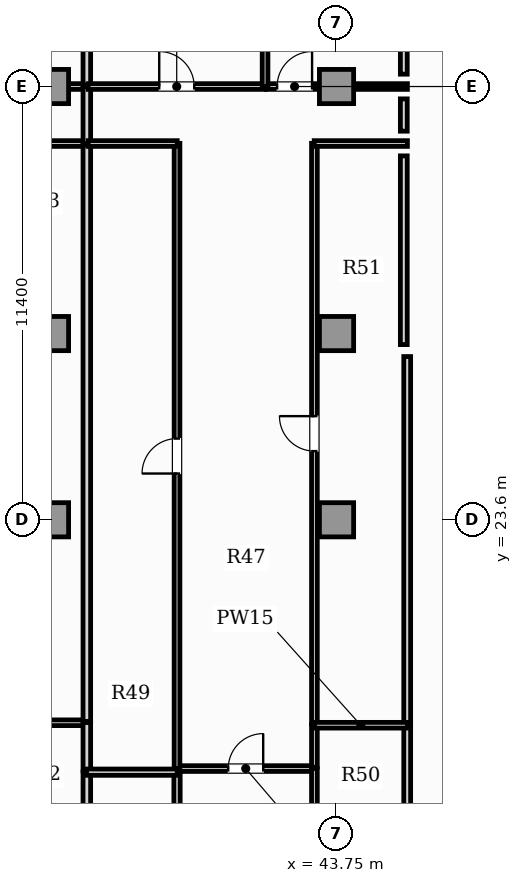
"""IFC4 building model, lengths in metres.
Left out: names, types, materials, properties, quantities, classifications, styles, units other than length and angle.
Written with IfcOpenShell. Run it as: python <this file> out.ifc"""

import sys

from ifc_helpers import new_model, si_unit, direction, frame, frame_2d, origin, origin_2d, place, context, subcontext, project, spatial, rectangle, extrude, element, fill, save


model = new_model("IFC4")
c1 = context("Model", 3, precision=1e-05, world=origin(), true_north=direction((0.0, 1.0)))
c2 = subcontext(c1, "Body", "Model", "MODEL_VIEW")
j1 = project(units=[si_unit("LENGTHUNIT", "METRE"), si_unit("PLANEANGLEUNIT", "RADIAN")], contexts=[c1])
p1 = place(None, origin())
s1 = spatial("IfcSite", under=j1, at=p1, CompositionType="ELEMENT")
p2 = place(p1, origin())
s2 = spatial("IfcBuilding", under=s1, at=p2, CompositionType="ELEMENT")
p3 = place(p2, frame((0.0, 0.0, 92.6)))
s3 = spatial("IfcBuildingStorey", under=s2, at=p3, CompositionType="ELEMENT", Elevation=92.6)
for number, where, z_axis, x_axis in (
    (1, (36.25, 23.6, 0.0), (0.0, 0.0, 1.0), (1.0, 0.0, 0.0)),
    (2, (43.75, 23.6, 0.0), (0.0, 0.0, 1.0), (1.0, 0.0, 0.0)),
    (3, (36.25, 28.5, 0.0), (0.0, 0.0, 1.0), (1.0, 0.0, 0.0)),
    (4, (43.75, 28.5, 0.0), (0.0, 0.0, 1.0), (1.0, 0.0, 0.0)),
    (5, (36.25, 35.0, 0.0), (0.0, 0.0, 1.0), (1.0, 0.0, 0.0)),
    (6, (43.75, 35.0, 0.0), (0.0, 0.0, 1.0), (1.0, 0.0, 0.0)),
):
    element("IfcColumn", number, at=place(p3, frame(where, z_axis=z_axis, x_axis=x_axis)), inside=s3, PredefinedType="COLUMN", context=c2, shape_type="SweptSolid", body=[
        extrude(rectangle(XDim=0.9, YDim=0.9, at=origin_2d()), origin(), (0.0, 0.0, 1.0), 3.85),
    ])
p4 = place(p3, frame((45.61, 13.765, 0.0), z_axis=(0.0, 0.0, 1.0), x_axis=(0.0, 1.0, 0.0)))
e7 = element("IfcWall", 7, at=p4, inside=s3, PredefinedType="PARTITIONING", context=c2, shape_type="SweptSolid", body=[
    extrude(rectangle(XDim=4.435, YDim=0.18, at=frame_2d((2.217, 0.0))), origin(), (0.0, 0.0, 1.0), 3.6),
])
p5 = place(p3, frame((45.61, 18.229, 0.0), z_axis=(0.0, 0.0, 1.0), x_axis=(0.0, 1.0, 0.0)))
e8 = element("IfcWall", 8, at=p5, inside=s3, PredefinedType="PARTITIONING", context=c2, shape_type="SweptSolid", body=[
    extrude(rectangle(XDim=9.666, YDim=0.18, at=frame_2d((4.833, 0.0))), origin(), (0.0, 0.0, 1.0), 3.6),
])
p6 = place(p3, frame((34.768, 33.5, 0.0), z_axis=(0.0, 0.0, 1.0), x_axis=(1.0, 0.0, 0.0)))
e9 = element("IfcWall", 9, at=p6, inside=s3, PredefinedType="PARTITIONING", context=c2, shape_type="SweptSolid", body=[
    extrude(rectangle(XDim=2.417, YDim=0.15, at=frame_2d((1.209, 0.0))), origin(), (0.0, 0.0, 1.0), 3.6),
])
p7 = place(p3, frame((33.475, 35.0, 0.0), z_axis=(0.0, 0.0, 1.0), x_axis=(1.0, 0.0, 0.0)))
e10 = element("IfcWall", 10, at=p7, inside=s3, PredefinedType="PARTITIONING", context=c2, shape_type="SweptSolid", body=[
    extrude(rectangle(XDim=3.71, YDim=0.15, at=frame_2d((1.855, 0.0))), origin(), (0.0, 0.0, 1.0), 2.983),
])
p8 = place(p7, frame((0.839, 0.0, 0.0)))
e11 = element("IfcOpeningElement", 11, at=p8, cuts=e10, PredefinedType="OPENING", context=c2, shape_type="SweptSolid", body=[
    extrude(rectangle(XDim=0.92, YDim=2.1, at=frame_2d((0.46, 1.05))), frame((0.0, 0.085, 0.0), z_axis=(0.0, -1.0, 0.0), x_axis=(1.0, 0.0, 0.0)), (0.0, 0.0, 1.0), 0.17),
])
p9 = place(p3, frame((37.18, 33.495, 0.0), z_axis=(0.0, 0.0, 1.0), x_axis=(0.0, 1.0, 0.0)))
e12 = element("IfcWall", 12, at=p9, inside=s3, PredefinedType="PARTITIONING", context=c2, shape_type="SweptSolid", body=[
    extrude(rectangle(XDim=1.51, YDim=0.2, at=frame_2d((0.755, 0.0))), origin(), (0.0, 0.0, 1.0), 3.6),
])
p10 = place(p3, frame((34.768, 18.26, 0.0), z_axis=(0.0, 0.0, 1.0), x_axis=(1.0, 0.0, 0.0)))
e13 = element("IfcWall", 13, at=p10, inside=s3, PredefinedType="PARTITIONING", context=c2, shape_type="SweptSolid", body=[
    extrude(rectangle(XDim=2.417, YDim=0.15, at=frame_2d((1.209, 0.0))), origin(), (0.0, 0.0, 1.0), 3.6),
])
p11 = place(p3, frame((37.18, 13.765, 0.0), z_axis=(0.0, 0.0, 1.0), x_axis=(0.0, 1.0, 0.0)))
e14 = element("IfcWall", 14, at=p11, inside=s3, PredefinedType="PARTITIONING", context=c2, shape_type="SweptSolid", body=[
    extrude(rectangle(XDim=3.199, YDim=0.2, at=frame_2d((1.6, 0.0))), origin(), (0.0, 0.0, 1.0), 3.6),
])
p12 = place(p3, frame((37.18, 16.994, 0.0), z_axis=(0.0, 0.0, 1.0), x_axis=(0.0, 1.0, 0.0)))
e15 = element("IfcWall", 15, at=p12, inside=s3, PredefinedType="PARTITIONING", context=c2, shape_type="SweptSolid", body=[
    extrude(rectangle(XDim=1.271, YDim=0.2, at=frame_2d((0.635, 0.0))), origin(), (0.0, 0.0, 1.0), 3.6),
])
p13 = place(p3, frame((37.18, 18.295, 0.0), z_axis=(0.0, 0.0, 1.0), x_axis=(0.0, 1.0, 0.0)))
e16 = element("IfcWall", 16, at=p13, inside=s3, PredefinedType="PARTITIONING", context=c2, shape_type="SweptSolid", body=[
    extrude(rectangle(XDim=15.17, YDim=0.2, at=frame_2d((7.585, 0.0))), origin(), (0.0, 0.0, 1.0), 3.6),
])
p14 = place(p3, frame((37.18, 35.035, 0.0), z_axis=(0.0, 0.0, 1.0), x_axis=(0.0, 1.0, 0.0)))
e17 = element("IfcWall", 17, at=p14, inside=s3, PredefinedType="PARTITIONING", context=c2, shape_type="SweptSolid", body=[
    extrude(rectangle(XDim=7.955, YDim=0.2, at=frame_2d((3.978, 0.0))), origin(), (0.0, 0.0, 1.0), 3.6),
])
p15 = place(p3, frame((39.548, 17.054, 0.0), z_axis=(0.0, 0.0, 1.0), x_axis=(1.0, 0.0, 0.0)))
e18 = element("IfcWall", 18, at=p15, inside=s3, PredefinedType="PARTITIONING", context=c2, shape_type="SweptSolid", body=[
    extrude(rectangle(XDim=3.625, YDim=0.15, at=frame_2d((1.812, 0.0))), origin(), (0.0, 0.0, 1.0), 3.6),
])
p16 = place(p15, frame((1.353, 0.0, 0.0)))
e19 = element("IfcOpeningElement", 19, at=p16, cuts=e18, PredefinedType="OPENING", context=c2, shape_type="SweptSolid", body=[
    extrude(rectangle(XDim=0.92, YDim=2.1, at=frame_2d((0.46, 1.05))), frame((0.0, 0.085, 0.0), z_axis=(0.0, -1.0, 0.0), x_axis=(1.0, 0.0, 0.0)), (0.0, 0.0, 1.0), 0.17),
])
p17 = place(p3, frame((39.553, 13.765, 0.0), z_axis=(0.0, 0.0, 1.0), x_axis=(0.0, 1.0, 0.0)))
e20 = element("IfcWall", 20, at=p17, inside=s3, PredefinedType="PLUMBINGWALL", context=c2, shape_type="SweptSolid", body=[
    extrude(rectangle(XDim=3.199, YDim=0.165, at=frame_2d((1.6, 0.0))), origin(), (0.0, 0.0, 1.0), 3.6),
])
p18 = place(p17, frame((1.175, 0.0, 0.0)))
e21 = element("IfcOpeningElement", 21, at=p18, cuts=e20, PredefinedType="OPENING", context=c2, shape_type="SweptSolid", body=[
    extrude(rectangle(XDim=0.85, YDim=2.1, at=frame_2d((0.425, 1.05))), frame((0.0, 0.093, 0.0), z_axis=(0.0, -1.0, 0.0), x_axis=(1.0, 0.0, 0.0)), (0.0, 0.0, 1.0), 0.185),
])
p19 = place(p3, frame((43.168, 13.765, 0.0), z_axis=(0.0, 0.0, 1.0), x_axis=(0.0, 1.0, 0.0)))
e22 = element("IfcWall", 22, at=p19, inside=s3, PredefinedType="PARTITIONING", context=c2, shape_type="SweptSolid", body=[
    extrude(rectangle(XDim=3.294, YDim=0.15, at=frame_2d((1.647, 0.0))), origin(), (0.0, 0.0, 1.0), 3.6),
])
p20 = place(p19, frame((1.187, 0.0, 0.0)))
e23 = element("IfcOpeningElement", 23, at=p20, cuts=e22, PredefinedType="OPENING", context=c2, shape_type="SweptSolid", body=[
    extrude(rectangle(XDim=0.92, YDim=2.1, at=frame_2d((0.46, 1.05))), frame((0.0, 0.085, 0.0), z_axis=(0.0, -1.0, 0.0), x_axis=(1.0, 0.0, 0.0)), (0.0, 0.0, 1.0), 0.17),
])
p21 = place(p3, frame((39.553, 17.049, 0.0), z_axis=(0.0, 0.0, 1.0), x_axis=(0.0, 1.0, 0.0)))
e24 = element("IfcWall", 24, at=p21, inside=s3, PredefinedType="PARTITIONING", context=c2, shape_type="SweptSolid", body=[
    extrude(rectangle(XDim=16.456, YDim=0.15, at=frame_2d((8.228, 0.0))), origin(), (0.0, 0.0, 1.0), 3.6),
])
p22 = place(p21, frame((7.768, 0.0, 0.0)))
e25 = element("IfcOpeningElement", 25, at=p22, cuts=e24, PredefinedType="OPENING", context=c2, shape_type="SweptSolid", body=[
    extrude(rectangle(XDim=0.92, YDim=2.1, at=frame_2d((0.46, 1.05))), frame((0.0, 0.085, 0.0), z_axis=(0.0, -1.0, 0.0), x_axis=(1.0, 0.0, 0.0)), (0.0, 0.0, 1.0), 0.17),
])
p23 = place(p3, frame((37.215, 33.5, 0.0), z_axis=(0.0, 0.0, 1.0), x_axis=(1.0, 0.0, 0.0)))
e26 = element("IfcWall", 26, at=p23, inside=s3, PredefinedType="PARTITIONING", context=c2, shape_type="SweptSolid", body=[
    extrude(rectangle(XDim=2.343, YDim=0.15, at=frame_2d((1.171, 0.0))), origin(), (0.0, 0.0, 1.0), 3.6),
])
p24 = place(p3, frame((43.168, 17.089, 0.0), z_axis=(0.0, 0.0, 1.0), x_axis=(0.0, 1.0, 0.0)))
e27 = element("IfcWall", 27, at=p24, inside=s3, PredefinedType="PARTITIONING", context=c2, shape_type="SweptSolid", body=[
    extrude(rectangle(XDim=1.11, YDim=0.15, at=frame_2d((0.555, 0.0))), origin(), (0.0, 0.0, 1.0), 3.6),
])
p25 = place(p3, frame((43.168, 18.229, 0.0), z_axis=(0.0, 0.0, 1.0), x_axis=(0.0, 1.0, 0.0)))
e28 = element("IfcWall", 28, at=p25, inside=s3, PredefinedType="PARTITIONING", context=c2, shape_type="SweptSolid", body=[
    extrude(rectangle(XDim=15.275, YDim=0.15, at=frame_2d((7.638, 0.0))), origin(), (0.0, 0.0, 1.0), 3.6),
])
p26 = place(p25, frame((7.178, 0.0, 0.0)))
e29 = element("IfcOpeningElement", 29, at=p26, cuts=e28, PredefinedType="OPENING", context=c2, shape_type="SweptSolid", body=[
    extrude(rectangle(XDim=0.92, YDim=2.1, at=frame_2d((0.46, 1.05))), frame((0.0, 0.085, 0.0), z_axis=(0.0, -1.0, 0.0), x_axis=(1.0, 0.0, 0.0)), (0.0, 0.0, 1.0), 0.17),
])
p27 = place(p3, frame((43.163, 33.5, 0.0), z_axis=(0.0, 0.0, 1.0), x_axis=(1.0, 0.0, 0.0)))
e30 = element("IfcWall", 30, at=p27, inside=s3, PredefinedType="PARTITIONING", context=c2, shape_type="SweptSolid", body=[
    extrude(rectangle(XDim=2.452, YDim=0.15, at=frame_2d((1.226, 0.0))), origin(), (0.0, 0.0, 1.0), 3.6),
])
p28 = place(p3, frame((37.215, 35.0, 0.0), z_axis=(0.0, 0.0, 1.0), x_axis=(1.0, 0.0, 0.0)))
e31 = element("IfcWall", 31, at=p28, inside=s3, PredefinedType="PARTITIONING", context=c2, shape_type="SweptSolid", body=[
    extrude(rectangle(XDim=4.66, YDim=0.15, at=frame_2d((2.33, 0.0))), origin(), (0.0, 0.0, 1.0), 2.983),
])
p29 = place(p28, frame((1.87, 0.0, 0.0)))
e32 = element("IfcOpeningElement", 32, at=p29, cuts=e31, PredefinedType="OPENING", context=c2, shape_type="SweptSolid", body=[
    extrude(rectangle(XDim=0.92, YDim=2.1, at=frame_2d((0.46, 1.05))), frame((0.0, 0.085, 0.0), z_axis=(0.0, -1.0, 0.0), x_axis=(1.0, 0.0, 0.0)), (0.0, 0.0, 1.0), 0.17),
])
p30 = place(p3, frame((41.905, 35.0, 0.0), z_axis=(0.0, 0.0, 1.0), x_axis=(1.0, 0.0, 0.0)))
e33 = element("IfcWall", 33, at=p30, inside=s3, PredefinedType="PARTITIONING", context=c2, shape_type="SweptSolid", body=[
    extrude(rectangle(XDim=3.71, YDim=0.15, at=frame_2d((1.855, 0.0))), origin(), (0.0, 0.0, 1.0), 2.983),
])
p31 = place(p30, frame((0.282, 0.0, 0.0)))
e34 = element("IfcOpeningElement", 34, at=p31, cuts=e33, PredefinedType="OPENING", context=c2, shape_type="SweptSolid", body=[
    extrude(rectangle(XDim=0.92, YDim=2.1, at=frame_2d((0.46, 1.05))), frame((0.0, 0.085, 0.0), z_axis=(0.0, -1.0, 0.0), x_axis=(1.0, 0.0, 0.0)), (0.0, 0.0, 1.0), 0.17),
])
p32 = place(p3, frame((37.175, 16.959, 0.0), z_axis=(0.0, 0.0, 1.0), x_axis=(1.0, 0.0, 0.0)))
e35 = element("IfcWall", 35, at=p32, inside=s3, PredefinedType="PLUMBINGWALL", context=c2, shape_type="SweptSolid", body=[
    extrude(rectangle(XDim=2.383, YDim=0.165, at=frame_2d((1.191, 0.0))), origin(), (0.0, 0.0, 1.0), 3.6),
])
p33 = place(p3, frame((43.163, 18.194, 0.0), z_axis=(0.0, 0.0, 1.0), x_axis=(1.0, 0.0, 0.0)))
e36 = element("IfcWall", 36, at=p33, inside=s3, PredefinedType="PARTITIONING", context=c2, shape_type="SweptSolid", body=[
    extrude(rectangle(XDim=2.452, YDim=0.15, at=frame_2d((1.226, 0.0))), origin(), (0.0, 0.0, 1.0), 3.6),
])
p34 = place(p3, frame((41.87, 34.995, 0.0), z_axis=(0.0, 0.0, 1.0), x_axis=(0.0, 1.0, 0.0)))
e37 = element("IfcWall", 37, at=p34, inside=s3, PredefinedType="PARTITIONING", context=c2, shape_type="SweptSolid", body=[
    extrude(rectangle(XDim=7.995, YDim=0.15, at=frame_2d((3.998, 0.0))), origin(), (0.0, 0.0, 1.0), 3.6),
])
p35 = place(p3, frame((45.52, 34.675, 0.0), z_axis=(0.0, 0.0, 1.0), x_axis=(0.0, -1.0, 0.0)))
e38 = element("IfcWall", 38, at=p35, inside=s3, PredefinedType="PARTITIONING", context=c2, shape_type="SweptSolid", body=[
    extrude(rectangle(XDim=0.85, YDim=0.18, at=frame_2d((0.425, 0.0))), origin(), (0.0, 0.0, 1.0), 3.6),
])
p36 = place(p3, frame((45.52, 33.175, 0.0), z_axis=(0.0, 0.0, 1.0), x_axis=(0.0, -1.0, 0.0)))
e39 = element("IfcWall", 39, at=p36, inside=s3, PredefinedType="PARTITIONING", context=c2, shape_type="SweptSolid", body=[
    extrude(rectangle(XDim=4.965, YDim=0.18, at=frame_2d((2.482, 0.0))), origin(), (0.0, 0.0, 1.0), 3.6),
])
p37 = place(p3, frame((45.52, 42.99, 0.0), z_axis=(0.0, 0.0, 1.0), x_axis=(0.0, -1.0, 0.0)))
e40 = element("IfcWall", 40, at=p37, inside=s3, PredefinedType="PARTITIONING", context=c2, shape_type="SweptSolid", body=[
    extrude(rectangle(XDim=7.665, YDim=0.18, at=frame_2d((3.833, 0.0))), origin(), (0.0, 0.0, 1.0), 3.6),
])
p38 = place(p16, origin())
e41 = element("IfcDoor", 41, at=p38, inside=s3, OperationType="SINGLE_SWING_RIGHT", PredefinedType="DOOR", context=c2, shape_type="SweptSolid", body=[
    extrude(rectangle(XDim=0.92, YDim=2.1, at=frame_2d((0.46, 1.05))), frame((0.0, 0.025, 0.0), z_axis=(0.0, -1.0, 0.0), x_axis=(1.0, 0.0, 0.0)), (0.0, 0.0, 1.0), 0.05),
])
fill(e19, e41)
p39 = place(p22, origin())
e42 = element("IfcDoor", 42, at=p39, inside=s3, OperationType="SINGLE_SWING_LEFT", PredefinedType="DOOR", context=c2, shape_type="SweptSolid", body=[
    extrude(rectangle(XDim=0.92, YDim=2.1, at=frame_2d((0.46, 1.05))), frame((0.0, 0.025, 0.0), z_axis=(0.0, -1.0, 0.0), x_axis=(1.0, 0.0, 0.0)), (0.0, 0.0, 1.0), 0.05),
])
fill(e25, e42)
p40 = place(p26, origin())
e43 = element("IfcDoor", 43, at=p40, inside=s3, OperationType="SINGLE_SWING_RIGHT", PredefinedType="DOOR", context=c2, shape_type="SweptSolid", body=[
    extrude(rectangle(XDim=0.92, YDim=2.1, at=frame_2d((0.46, 1.05))), frame((0.0, 0.025, 0.0), z_axis=(0.0, -1.0, 0.0), x_axis=(1.0, 0.0, 0.0)), (0.0, 0.0, 1.0), 0.05),
])
fill(e29, e43)
p41 = place(p29, origin())
e44 = element("IfcDoor", 44, at=p41, inside=s3, OperationType="SINGLE_SWING_LEFT", PredefinedType="DOOR", context=c2, shape_type="SweptSolid", body=[
    extrude(rectangle(XDim=0.92, YDim=2.1, at=frame_2d((0.46, 1.05))), frame((0.0, 0.025, 0.0), z_axis=(0.0, -1.0, 0.0), x_axis=(1.0, 0.0, 0.0)), (0.0, 0.0, 1.0), 0.05),
])
fill(e32, e44)
p42 = place(p31, origin())
e45 = element("IfcDoor", 45, at=p42, inside=s3, OperationType="SINGLE_SWING_RIGHT", PredefinedType="DOOR", context=c2, shape_type="SweptSolid", body=[
    extrude(rectangle(XDim=0.92, YDim=2.1, at=frame_2d((0.46, 1.05))), frame((0.0, 0.025, 0.0), z_axis=(0.0, -1.0, 0.0), x_axis=(1.0, 0.0, 0.0)), (0.0, 0.0, 1.0), 0.05),
])
fill(e34, e45)
save(model, sys.argv[1])
